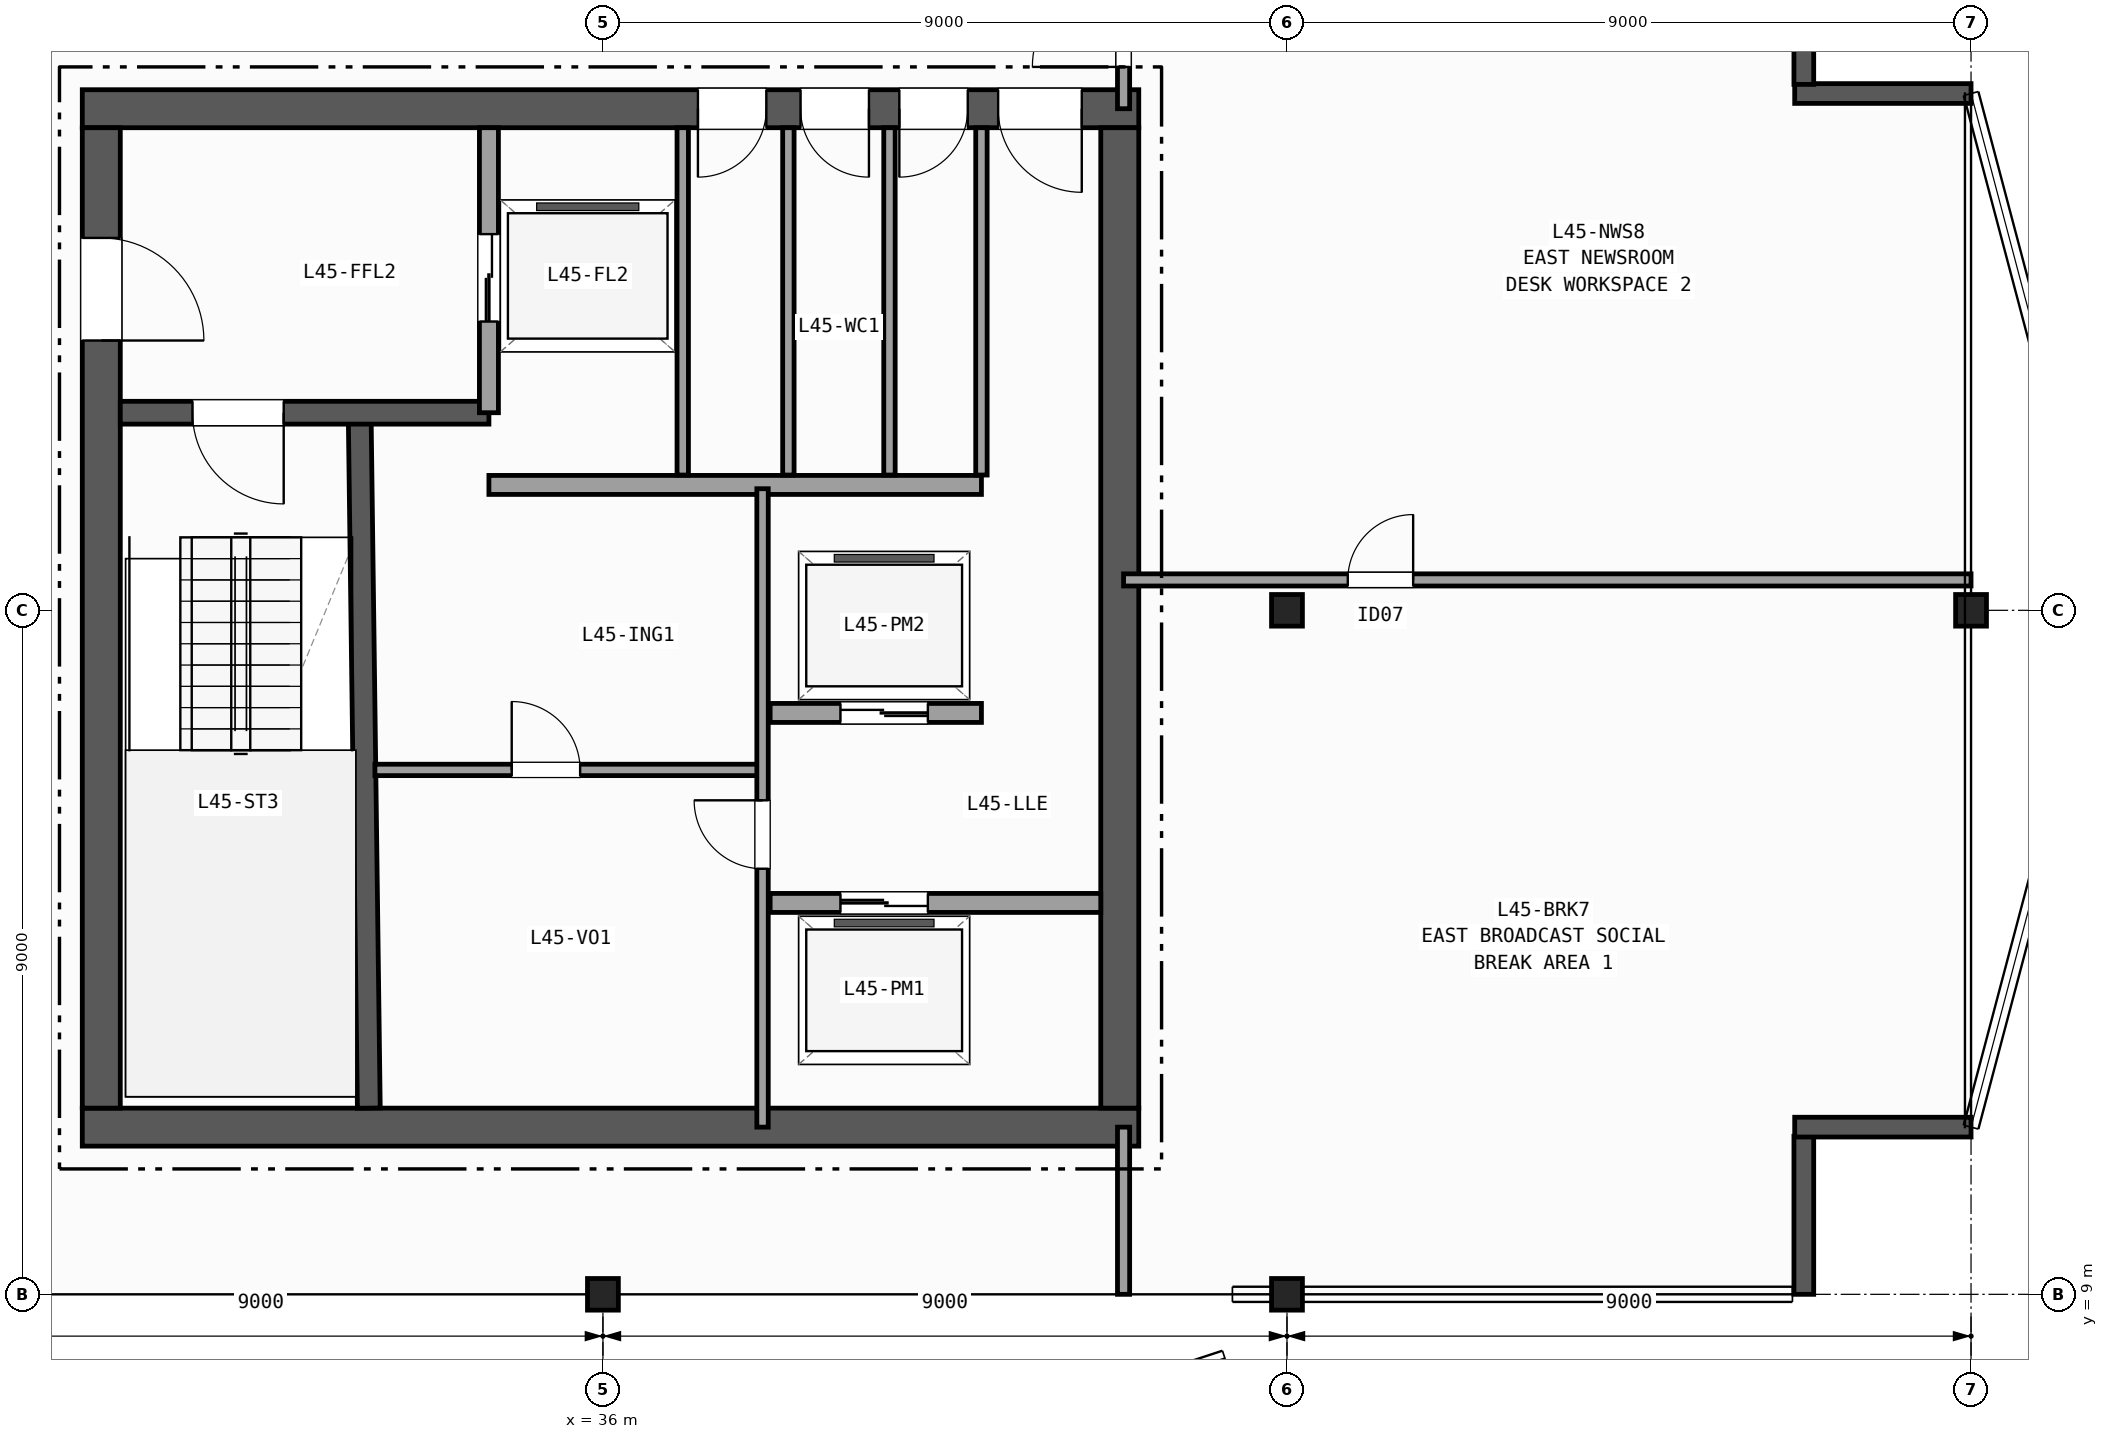
"""IFC4 building model, lengths in metres.
Left out: names, types, materials, properties, quantities, classifications, styles, units other than length and angle.
Written with IfcOpenShell. Run it as: python <this file> out.ifc"""

import sys

from ifc_helpers import new_model, si_unit, direction, frame, frame_2d, origin, origin_2d, place, context, subcontext, project, spatial, rectangle, i_section, extrude, element, fill, save


model = new_model("IFC4")
c1 = context("Model", 3, precision=1e-05, world=origin(), true_north=direction((0.0, 1.0)))
c2 = subcontext(c1, "Body", "Model", "MODEL_VIEW")
j1 = project(units=[si_unit("LENGTHUNIT", "METRE"), si_unit("PLANEANGLEUNIT", "RADIAN")], contexts=[c1])
p1 = place(None, origin())
s1 = spatial("IfcSite", under=j1, at=p1, CompositionType="ELEMENT")
p2 = place(p1, origin())
s2 = spatial("IfcBuilding", under=s1, at=p2, CompositionType="ELEMENT")
p3 = place(p2, frame((0.0, 0.0, 181.6)))
s3 = spatial("IfcBuildingStorey", under=s2, at=p3, CompositionType="ELEMENT", Elevation=181.6)
for number, where, z_axis, x_axis in (
    (1, (36.0, 9.0, 0.0), (0.0, 0.0, 1.0), (1.0, 0.0, 0.0)),
    (2, (45.0, 9.0, 0.0), (0.0, 0.0, 1.0), (1.0, 0.0, 0.0)),
    (3, (45.0, 18.0, 0.0), (0.0, 0.0, 1.0), (1.0, 0.0, 0.0)),
    (4, (54.0, 18.0, 0.0), (0.0, 0.0, 1.0), (1.0, 0.0, 0.0)),
):
    element("IfcColumn", number, at=place(p3, frame(where, z_axis=z_axis, x_axis=x_axis)), inside=s3, PredefinedType="COLUMN", context=c2, shape_type="SweptSolid", body=[
        extrude(i_section(OverallWidth=0.406, OverallDepth=0.416, WebThickness=0.03, FlangeThickness=0.048, FilletRadius=0.015, at=origin_2d()), origin(), (0.0, 0.0, 1.0), 3.7),
    ])
p4 = place(p3, frame((51.8, 9.0, 0.0), z_axis=(0.0, 0.0, 1.0), x_axis=(0.0, 1.0, 0.0)))
e5 = element("IfcWall", 5, at=p4, inside=s3, PredefinedType="SOLIDWALL", context=c2, shape_type="SweptSolid", body=[
    extrude(rectangle(XDim=2.08, YDim=0.26, at=frame_2d((1.04, 0.0))), origin(), (0.0, 0.0, 1.0), 3.42),
])
for number, where, z_axis, x_axis in (
    (6, (51.68, 11.2, 0.0), (0.0, 0.0, 1.0), (1.0, 0.0, 0.0)),
    (7, (54.0, 24.8, 0.0), (0.0, 0.0, 1.0), (-1.0, 0.0, 0.0)),
):
    element("IfcWall", number, at=place(p3, frame(where, z_axis=z_axis, x_axis=x_axis)), inside=s3, PredefinedType="SOLIDWALL", context=c2, shape_type="SweptSolid", body=[
        extrude(rectangle(XDim=2.32, YDim=0.26, at=frame_2d((1.16, 0.0))), origin(), (0.0, 0.0, 1.0), 3.42),
    ])
p5 = place(p3, frame((51.8, 24.92, 0.0), z_axis=(0.0, 0.0, 1.0), x_axis=(0.0, 1.0, 0.0)))
e8 = element("IfcWall", 8, at=p5, inside=s3, PredefinedType="SOLIDWALL", context=c2, shape_type="SweptSolid", body=[
    extrude(rectangle(XDim=2.08, YDim=0.26, at=frame_2d((1.04, 0.0))), origin(), (0.0, 0.0, 1.0), 3.42),
])
p6 = place(p3, frame((29.15, 11.2, 0.0), z_axis=(0.0, 0.0, 1.0), x_axis=(1.0, 0.0, 0.0)))
e9 = element("IfcWall", 9, at=p6, inside=s3, PredefinedType="SHEAR", context=c2, shape_type="SweptSolid", body=[
    extrude(rectangle(XDim=13.9, YDim=0.5, at=frame_2d((6.95, 0.0))), origin(), (0.0, 0.0, 1.0), 3.42),
])
p7 = place(p3, frame((43.05, 24.6, 0.0), z_axis=(0.0, 0.0, 1.0), x_axis=(-1.0, 0.0, 0.0)))
e10 = element("IfcWall", 10, at=p7, inside=s3, PredefinedType="SHEAR", context=c2, shape_type="SweptSolid", body=[
    extrude(rectangle(XDim=13.9, YDim=0.5, at=frame_2d((6.95, 0.0))), origin(), (0.0, 0.0, 1.0), 3.42),
])
p8 = place(p7, frame((0.75, 0.0, 0.0)))
e11 = element("IfcOpeningElement", 11, at=p8, cuts=e10, PredefinedType="OPENING", context=c2, shape_type="SweptSolid", body=[
    extrude(rectangle(XDim=1.1, YDim=2.15, at=frame_2d((0.55, 1.075))), frame((0.0, 0.26, 0.0), z_axis=(0.0, -1.0, 0.0), x_axis=(1.0, 0.0, 0.0)), (0.0, 0.0, 1.0), 0.52),
])
p9 = place(p7, frame((2.25, 0.0, 0.0)))
e12 = element("IfcOpeningElement", 12, at=p9, cuts=e10, PredefinedType="OPENING", context=c2, shape_type="SweptSolid", body=[
    extrude(rectangle(XDim=0.9, YDim=2.1, at=frame_2d((0.45, 1.05))), frame((0.0, 0.26, 0.0), z_axis=(0.0, -1.0, 0.0), x_axis=(1.0, 0.0, 0.0)), (0.0, 0.0, 1.0), 0.52),
])
p10 = place(p7, frame((3.55, 0.0, 0.0)))
e13 = element("IfcOpeningElement", 13, at=p10, cuts=e10, PredefinedType="OPENING", context=c2, shape_type="SweptSolid", body=[
    extrude(rectangle(XDim=0.9, YDim=2.1, at=frame_2d((0.45, 1.05))), frame((0.0, 0.26, 0.0), z_axis=(0.0, -1.0, 0.0), x_axis=(1.0, 0.0, 0.0)), (0.0, 0.0, 1.0), 0.52),
])
p11 = place(p7, frame((4.9, 0.0, 0.0)))
e14 = element("IfcOpeningElement", 14, at=p11, cuts=e10, PredefinedType="OPENING", context=c2, shape_type="SweptSolid", body=[
    extrude(rectangle(XDim=0.9, YDim=2.1, at=frame_2d((0.45, 1.05))), frame((0.0, 0.26, 0.0), z_axis=(0.0, -1.0, 0.0), x_axis=(1.0, 0.0, 0.0)), (0.0, 0.0, 1.0), 0.52),
])
p12 = place(p3, frame((29.4, 24.35, 0.0), z_axis=(0.0, 0.0, 1.0), x_axis=(0.0, -1.0, 0.0)))
e15 = element("IfcWall", 15, at=p12, inside=s3, PredefinedType="SHEAR", context=c2, shape_type="SweptSolid", body=[
    extrude(rectangle(XDim=12.9, YDim=0.5, at=frame_2d((6.45, 0.0))), origin(), (0.0, 0.0, 1.0), 3.42),
])
p13 = place(p12, frame((1.45, 0.0, 0.0)))
e16 = element("IfcOpeningElement", 16, at=p13, cuts=e15, PredefinedType="OPENING", context=c2, shape_type="SweptSolid", body=[
    extrude(rectangle(XDim=1.35, YDim=2.15, at=frame_2d((0.675, 1.075))), frame((0.0, 0.26, 0.0), z_axis=(0.0, -1.0, 0.0), x_axis=(1.0, 0.0, 0.0)), (0.0, 0.0, 1.0), 0.52),
])
p14 = place(p3, frame((42.8, 11.45, 0.0), z_axis=(0.0, 0.0, 1.0), x_axis=(0.0, 1.0, 0.0)))
e17 = element("IfcWall", 17, at=p14, inside=s3, PredefinedType="SHEAR", context=c2, shape_type="SweptSolid", body=[
    extrude(rectangle(XDim=12.9, YDim=0.5, at=frame_2d((6.45, 0.0))), origin(), (0.0, 0.0, 1.0), 3.42),
])
p15 = place(p3, frame((32.92, 11.45, 0.0), z_axis=(0.0, 0.0, 1.0), x_axis=(-0.013171578211, 0.999913251001, 0.0)))
e18 = element("IfcWall", 18, at=p15, inside=s3, PredefinedType="SHEAR", context=c2, shape_type="SweptSolid", body=[
    extrude(rectangle(XDim=9.101, YDim=0.3, at=frame_2d((4.55, 0.0))), origin(), (0.0, 0.0, 1.0), 3.42),
])
p16 = place(p3, frame((34.5, 20.6, 0.0), z_axis=(0.0, 0.0, 1.0), x_axis=(-1.0, 0.0, 0.0)))
e19 = element("IfcWall", 19, at=p16, inside=s3, PredefinedType="SHEAR", context=c2, shape_type="SweptSolid", body=[
    extrude(rectangle(XDim=4.85, YDim=0.3, at=frame_2d((2.425, 0.0))), origin(), (0.0, 0.0, 1.0), 3.42),
])
p17 = place(p16, frame((2.7, 0.0, 0.0)))
e20 = element("IfcOpeningElement", 20, at=p17, cuts=e19, PredefinedType="OPENING", context=c2, shape_type="SweptSolid", body=[
    extrude(rectangle(XDim=1.2, YDim=2.15, at=frame_2d((0.6, 1.075))), frame((0.0, 0.16, 0.0), z_axis=(0.0, -1.0, 0.0), x_axis=(1.0, 0.0, 0.0)), (0.0, 0.0, 1.0), 0.32),
])
p18 = place(p3, frame((34.5, 20.6, 0.0), z_axis=(0.0, 0.0, 1.0), x_axis=(0.0, 1.0, 0.0)))
e21 = element("IfcWall", 21, at=p18, inside=s3, PredefinedType="PARTITIONING", context=c2, shape_type="SweptSolid", body=[
    extrude(rectangle(XDim=3.75, YDim=0.25, at=frame_2d((1.875, 0.0))), origin(), (0.0, 0.0, 1.0), 3.42),
])
p19 = place(p18, frame((1.2, 0.0, 0.0)))
e22 = element("IfcOpeningElement", 22, at=p19, cuts=e21, PredefinedType="OPENING", context=c2, shape_type="SweptSolid", body=[
    extrude(rectangle(XDim=1.15, YDim=2.15, at=frame_2d((0.575, 1.075))), frame((0.0, 0.135, 0.0), z_axis=(0.0, -1.0, 0.0), x_axis=(1.0, 0.0, 0.0)), (0.0, 0.0, 1.0), 0.27),
])
p20 = place(p3, frame((34.5, 19.65, 0.0), z_axis=(0.0, 0.0, 1.0), x_axis=(1.0, 0.0, 0.0)))
e23 = element("IfcWall", 23, at=p20, inside=s3, PredefinedType="PARTITIONING", context=c2, shape_type="SweptSolid", body=[
    extrude(rectangle(XDim=6.48, YDim=0.25, at=frame_2d((3.24, 0.0))), origin(), (0.0, 0.0, 1.0), 3.42),
])
p21 = place(p3, frame((38.2, 14.15, 0.0), z_axis=(0.0, 0.0, 1.0), x_axis=(1.0, 0.0, 0.0)))
e24 = element("IfcWall", 24, at=p21, inside=s3, PredefinedType="PARTITIONING", context=c2, shape_type="SweptSolid", body=[
    extrude(rectangle(XDim=4.35, YDim=0.25, at=frame_2d((2.175, 0.0))), origin(), (0.0, 0.0, 1.0), 3.42),
])
p22 = place(p21, frame((0.925, 0.0, 0.0)))
e25 = element("IfcOpeningElement", 25, at=p22, cuts=e24, PredefinedType="OPENING", context=c2, shape_type="SweptSolid", body=[
    extrude(rectangle(XDim=1.15, YDim=2.15, at=frame_2d((0.575, 1.075))), frame((0.0, 0.135, 0.0), z_axis=(0.0, -1.0, 0.0), x_axis=(1.0, 0.0, 0.0)), (0.0, 0.0, 1.0), 0.27),
])
p23 = place(p3, frame((40.98, 16.65, 0.0), z_axis=(0.0, 0.0, 1.0), x_axis=(-1.0, 0.0, 0.0)))
e26 = element("IfcWall", 26, at=p23, inside=s3, PredefinedType="PARTITIONING", context=c2, shape_type="SweptSolid", body=[
    extrude(rectangle(XDim=2.78, YDim=0.25, at=frame_2d((1.39, 0.0))), origin(), (0.0, 0.0, 1.0), 3.42),
])
p24 = place(p23, frame((0.705, 0.0, 0.0)))
e27 = element("IfcOpeningElement", 27, at=p24, cuts=e26, PredefinedType="OPENING", context=c2, shape_type="SweptSolid", body=[
    extrude(rectangle(XDim=1.15, YDim=2.15, at=frame_2d((0.575, 1.075))), frame((0.0, 0.135, 0.0), z_axis=(0.0, -1.0, 0.0), x_axis=(1.0, 0.0, 0.0)), (0.0, 0.0, 1.0), 0.27),
])
p25 = place(p3, frame((33.0, 15.9, 0.0), z_axis=(0.0, 0.0, 1.0), x_axis=(1.0, 0.0, 0.0)))
e28 = element("IfcWall", 28, at=p25, inside=s3, PredefinedType="PARTITIONING", context=c2, shape_type="SweptSolid", body=[
    extrude(rectangle(XDim=5.1, YDim=0.15, at=frame_2d((2.55, 0.0))), origin(), (0.0, 0.0, 1.0), 3.42),
])
p26 = place(p25, frame((1.8, 0.0, 0.0)))
e29 = element("IfcOpeningElement", 29, at=p26, cuts=e28, PredefinedType="OPENING", context=c2, shape_type="SweptSolid", body=[
    extrude(rectangle(XDim=0.9, YDim=2.1, at=frame_2d((0.45, 1.05))), frame((0.0, 0.085, 0.0), z_axis=(0.0, -1.0, 0.0), x_axis=(1.0, 0.0, 0.0)), (0.0, 0.0, 1.0), 0.17),
])
p27 = place(p3, frame((38.1, 11.2, 0.0), z_axis=(0.0, 0.0, 1.0), x_axis=(0.0, 1.0, 0.0)))
e30 = element("IfcWall", 30, at=p27, inside=s3, PredefinedType="PARTITIONING", context=c2, shape_type="SweptSolid", body=[
    extrude(rectangle(XDim=8.4, YDim=0.15, at=frame_2d((4.2, 0.0))), origin(), (0.0, 0.0, 1.0), 3.42),
])
p28 = place(p27, frame((3.4, 0.0, 0.0)))
e31 = element("IfcOpeningElement", 31, at=p28, cuts=e30, PredefinedType="OPENING", context=c2, shape_type="SweptSolid", body=[
    extrude(rectangle(XDim=0.9, YDim=2.1, at=frame_2d((0.45, 1.05))), frame((0.0, 0.085, 0.0), z_axis=(0.0, -1.0, 0.0), x_axis=(1.0, 0.0, 0.0)), (0.0, 0.0, 1.0), 0.17),
])
for number, where, z_axis, x_axis in (
    (32, (37.05, 19.78, 0.0), (0.0, 0.0, 1.0), (0.0, 1.0, 0.0)),
    (33, (38.44, 19.78, 0.0), (0.0, 0.0, 1.0), (0.0, 1.0, 0.0)),
    (34, (39.77, 19.78, 0.0), (0.0, 0.0, 1.0), (0.0, 1.0, 0.0)),
    (35, (40.98, 19.78, 0.0), (0.0, 0.0, 1.0), (0.0, 1.0, 0.0)),
):
    element("IfcWall", number, at=place(p3, frame(where, z_axis=z_axis, x_axis=x_axis)), inside=s3, PredefinedType="PARTITIONING", context=c2, shape_type="SweptSolid", body=[
        extrude(rectangle(XDim=4.57, YDim=0.15, at=frame_2d((2.285, 0.0))), origin(), (0.0, 0.0, 1.0), 3.42),
    ])
p29 = place(p3, frame((42.85, 9.0, 0.0), z_axis=(0.0, 0.0, 1.0), x_axis=(0.0, 1.0, 0.0)))
e36 = element("IfcWall", 36, at=p29, inside=s3, PredefinedType="PARTITIONING", context=c2, shape_type="SweptSolid", body=[
    extrude(rectangle(XDim=2.2, YDim=0.16, at=frame_2d((1.1, 0.0))), origin(), (0.0, 0.0, 1.0), 2.634),
])
p30 = place(p3, frame((42.85, 24.6, 0.0), z_axis=(0.0, 0.0, 1.0), x_axis=(0.0, 1.0, 0.0)))
e37 = element("IfcWall", 37, at=p30, inside=s3, PredefinedType="PARTITIONING", context=c2, shape_type="SweptSolid", body=[
    extrude(rectangle(XDim=2.4, YDim=0.16, at=frame_2d((1.2, 0.0))), origin(), (0.0, 0.0, 1.0), 2.634),
])
p31 = place(p30, frame((0.55, 0.0, 0.0)))
e38 = element("IfcOpeningElement", 38, at=p31, cuts=e37, PredefinedType="OPENING", context=c2, shape_type="SweptSolid", body=[
    extrude(rectangle(XDim=1.2, YDim=2.15, at=frame_2d((0.6, 1.075))), frame((0.0, 0.09, 0.0), z_axis=(0.0, -1.0, 0.0), x_axis=(1.0, 0.0, 0.0)), (0.0, 0.0, 1.0), 0.18),
])
p32 = place(p3, frame((42.85, 18.4, 0.0), z_axis=(0.0, 0.0, 1.0), x_axis=(1.0, 0.0, 0.0)))
e39 = element("IfcWall", 39, at=p32, inside=s3, PredefinedType="PARTITIONING", context=c2, shape_type="SweptSolid", body=[
    extrude(rectangle(XDim=11.15, YDim=0.16, at=frame_2d((5.575, 0.0))), origin(), (0.0, 0.0, 1.0), 3.42),
])
p33 = place(p32, frame((2.95, 0.0, 0.0)))
e40 = element("IfcOpeningElement", 40, at=p33, cuts=e39, PredefinedType="OPENING", context=c2, shape_type="SweptSolid", body=[
    extrude(rectangle(XDim=0.86, YDim=2.05, at=frame_2d((0.43, 1.025))), frame((0.0, 0.09, 0.0), z_axis=(0.0, -1.0, 0.0), x_axis=(1.0, 0.0, 0.0)), (0.0, 0.0, 1.0), 0.18),
])
p34 = place(p17, origin())
e41 = element("IfcDoor", 41, at=p34, inside=s3, OperationType="SINGLE_SWING_LEFT", PredefinedType="DOOR", context=c2, shape_type="SweptSolid", body=[
    extrude(rectangle(XDim=1.2, YDim=2.15, at=frame_2d((0.6, 1.075))), frame((0.0, 0.025, 0.0), z_axis=(0.0, -1.0, 0.0), x_axis=(1.0, 0.0, 0.0)), (0.0, 0.0, 1.0), 0.05),
])
fill(e20, e41)
p35 = place(p13, origin())
e42 = element("IfcDoor", 42, at=p35, inside=s3, OperationType="SINGLE_SWING_RIGHT", PredefinedType="DOOR", context=c2, shape_type="SweptSolid", body=[
    extrude(rectangle(XDim=1.35, YDim=2.15, at=frame_2d((0.675, 1.075))), frame((0.0, 0.025, 0.0), z_axis=(0.0, -1.0, 0.0), x_axis=(1.0, 0.0, 0.0)), (0.0, 0.0, 1.0), 0.05),
])
fill(e16, e42)
p36 = place(p8, origin())
e43 = element("IfcDoor", 43, at=p36, inside=s3, OperationType="SINGLE_SWING_LEFT", PredefinedType="DOOR", context=c2, shape_type="SweptSolid", body=[
    extrude(rectangle(XDim=1.1, YDim=2.15, at=frame_2d((0.55, 1.075))), frame((0.0, 0.025, 0.0), z_axis=(0.0, -1.0, 0.0), x_axis=(1.0, 0.0, 0.0)), (0.0, 0.0, 1.0), 0.05),
])
fill(e11, e43)
p37 = place(p9, origin())
e44 = element("IfcDoor", 44, at=p37, inside=s3, OperationType="SINGLE_SWING_RIGHT", PredefinedType="DOOR", context=c2, shape_type="SweptSolid", body=[
    extrude(rectangle(XDim=0.9, YDim=2.1, at=frame_2d((0.45, 1.05))), frame((0.0, 0.025, 0.0), z_axis=(0.0, -1.0, 0.0), x_axis=(1.0, 0.0, 0.0)), (0.0, 0.0, 1.0), 0.05),
])
fill(e12, e44)
p38 = place(p10, origin())
e45 = element("IfcDoor", 45, at=p38, inside=s3, OperationType="SINGLE_SWING_LEFT", PredefinedType="DOOR", context=c2, shape_type="SweptSolid", body=[
    extrude(rectangle(XDim=0.9, YDim=2.1, at=frame_2d((0.45, 1.05))), frame((0.0, 0.025, 0.0), z_axis=(0.0, -1.0, 0.0), x_axis=(1.0, 0.0, 0.0)), (0.0, 0.0, 1.0), 0.05),
])
fill(e13, e45)
p39 = place(p11, origin())
e46 = element("IfcDoor", 46, at=p39, inside=s3, OperationType="SINGLE_SWING_RIGHT", PredefinedType="DOOR", context=c2, shape_type="SweptSolid", body=[
    extrude(rectangle(XDim=0.9, YDim=2.1, at=frame_2d((0.45, 1.05))), frame((0.0, 0.025, 0.0), z_axis=(0.0, -1.0, 0.0), x_axis=(1.0, 0.0, 0.0)), (0.0, 0.0, 1.0), 0.05),
])
fill(e14, e46)
p40 = place(p19, origin())
e47 = element("IfcDoor", 47, at=p40, inside=s3, OperationType="DOUBLE_DOOR_SLIDING", PredefinedType="DOOR", context=c2, shape_type="SweptSolid", body=[
    extrude(rectangle(XDim=1.15, YDim=2.15, at=frame_2d((0.575, 1.075))), frame((0.0, 0.025, 0.0), z_axis=(0.0, -1.0, 0.0), x_axis=(1.0, 0.0, 0.0)), (0.0, 0.0, 1.0), 0.05),
])
fill(e22, e47)
p41 = place(p22, origin())
e48 = element("IfcDoor", 48, at=p41, inside=s3, OperationType="DOUBLE_DOOR_SLIDING", PredefinedType="DOOR", context=c2, shape_type="SweptSolid", body=[
    extrude(rectangle(XDim=1.15, YDim=2.15, at=frame_2d((0.575, 1.075))), frame((0.0, 0.025, 0.0), z_axis=(0.0, -1.0, 0.0), x_axis=(1.0, 0.0, 0.0)), (0.0, 0.0, 1.0), 0.05),
])
fill(e25, e48)
p42 = place(p24, origin())
e49 = element("IfcDoor", 49, at=p42, inside=s3, OperationType="DOUBLE_DOOR_SLIDING", PredefinedType="DOOR", context=c2, shape_type="SweptSolid", body=[
    extrude(rectangle(XDim=1.15, YDim=2.15, at=frame_2d((0.575, 1.075))), frame((0.0, 0.025, 0.0), z_axis=(0.0, -1.0, 0.0), x_axis=(1.0, 0.0, 0.0)), (0.0, 0.0, 1.0), 0.05),
])
fill(e27, e49)
p43 = place(p28, origin())
e50 = element("IfcDoor", 50, at=p43, inside=s3, OperationType="SINGLE_SWING_RIGHT", PredefinedType="DOOR", context=c2, shape_type="SweptSolid", body=[
    extrude(rectangle(XDim=0.9, YDim=2.1, at=frame_2d((0.45, 1.05))), frame((0.0, 0.025, 0.0), z_axis=(0.0, -1.0, 0.0), x_axis=(1.0, 0.0, 0.0)), (0.0, 0.0, 1.0), 0.05),
])
fill(e31, e50)
p44 = place(p26, origin())
e51 = element("IfcDoor", 51, at=p44, inside=s3, OperationType="SINGLE_SWING_LEFT", PredefinedType="DOOR", context=c2, shape_type="SweptSolid", body=[
    extrude(rectangle(XDim=0.9, YDim=2.1, at=frame_2d((0.45, 1.05))), frame((0.0, 0.025, 0.0), z_axis=(0.0, -1.0, 0.0), x_axis=(1.0, 0.0, 0.0)), (0.0, 0.0, 1.0), 0.05),
])
fill(e29, e51)
p45 = place(p31, origin())
e52 = element("IfcDoor", 52, at=p45, inside=s3, OperationType="SINGLE_SWING_LEFT", PredefinedType="DOOR", context=c2, shape_type="SweptSolid", body=[
    extrude(rectangle(XDim=1.2, YDim=2.15, at=frame_2d((0.6, 1.075))), frame((0.0, 0.025, 0.0), z_axis=(0.0, -1.0, 0.0), x_axis=(1.0, 0.0, 0.0)), (0.0, 0.0, 1.0), 0.05),
])
fill(e38, e52)
p46 = place(p33, origin())
e53 = element("IfcDoor", 53, at=p46, inside=s3, OperationType="SINGLE_SWING_RIGHT", PredefinedType="DOOR", context=c2, shape_type="SweptSolid", body=[
    extrude(rectangle(XDim=0.86, YDim=2.05, at=frame_2d((0.43, 1.025))), frame((0.0, 0.025, 0.0), z_axis=(0.0, -1.0, 0.0), x_axis=(1.0, 0.0, 0.0)), (0.0, 0.0, 1.0), 0.05),
])
fill(e40, e53)
save(model, sys.argv[1])
